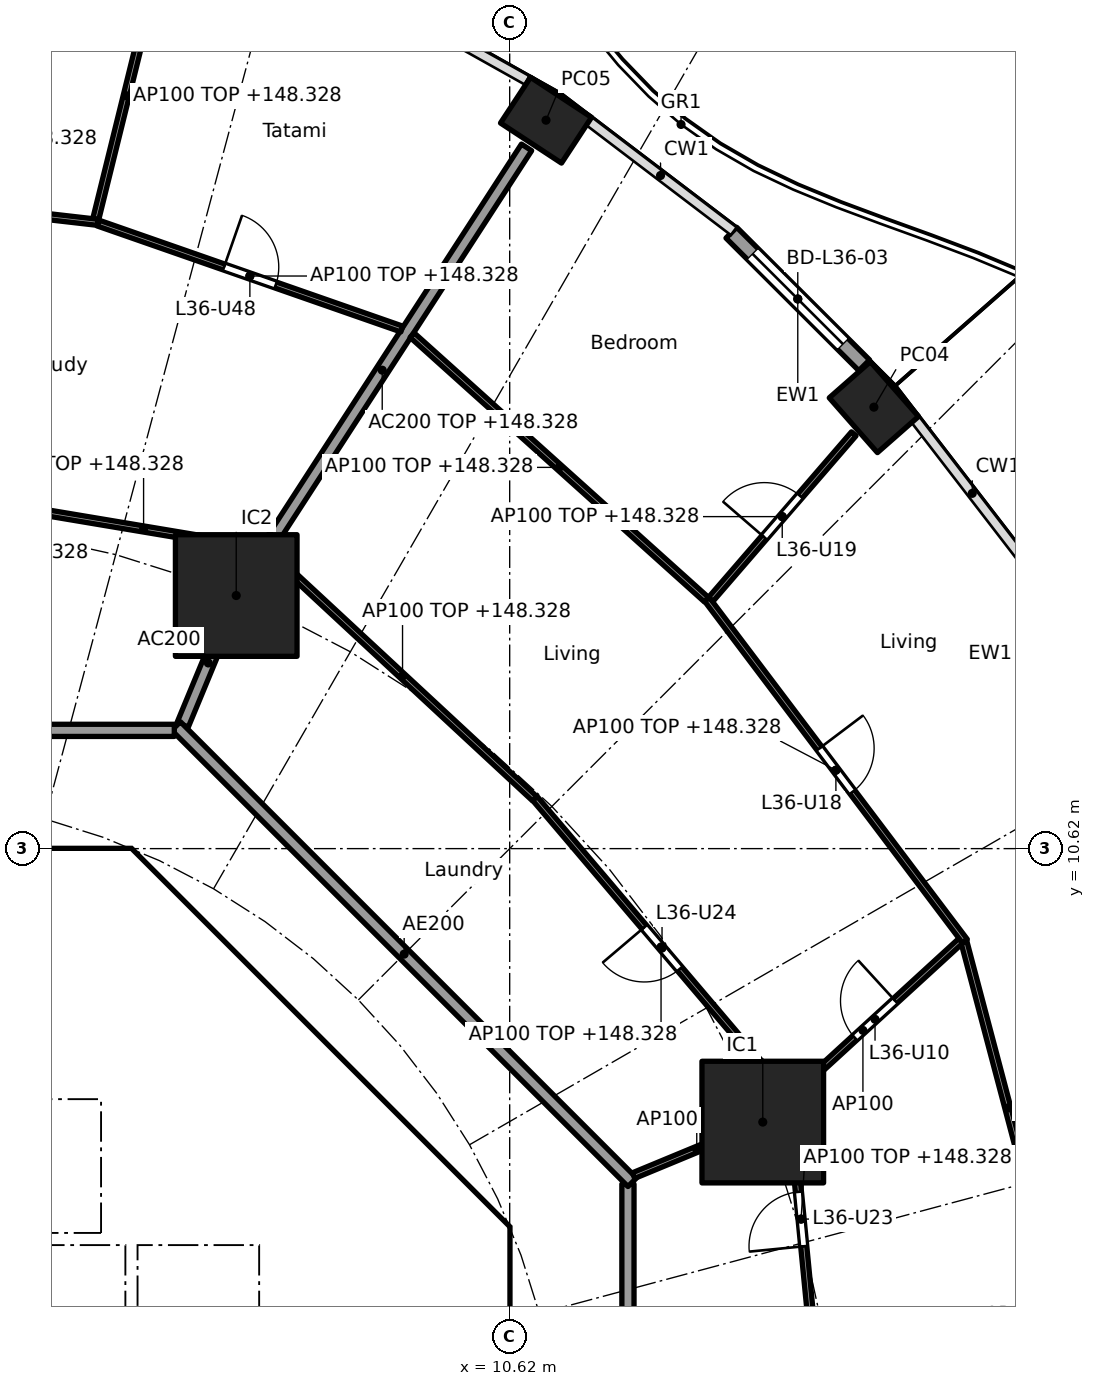
"""IFC4 building model, lengths in metres.
Left out: names, types, materials, properties, quantities, classifications, styles, units other than length and angle.
Written with IfcOpenShell. Run it as: python <this file> out.ifc"""

import sys

from ifc_helpers import new_model, si_unit, direction, frame, frame_2d, origin, origin_2d, place, context, subcontext, project, spatial, polyline, rectangle, hollow_rectangle, outline, extrude, element, fill, save


model = new_model("IFC4")
c1 = context("Model", 3, precision=1e-05, world=origin(), true_north=direction((0.0, 1.0)))
c2 = subcontext(c1, "Body", "Model", "MODEL_VIEW")
j1 = project(units=[si_unit("LENGTHUNIT", "METRE"), si_unit("PLANEANGLEUNIT", "RADIAN")], contexts=[c1])
p1 = place(None, origin())
s1 = spatial("IfcSite", under=j1, at=p1, CompositionType="ELEMENT")
p2 = place(p1, origin())
s2 = spatial("IfcBuilding", under=s1, at=p2, CompositionType="ELEMENT")
p3 = place(p2, frame((0.0, 0.0, 145.5)))
s3 = spatial("IfcBuildingStorey", under=s2, at=p3, CompositionType="ELEMENT", Elevation=145.5)
for number, where, z_axis, x_axis in (
    (1, (16.61, 17.88, 0.0), (0.0, 0.0, 1.0), (-0.66, 0.751, 0.0)),
    (2, (11.218, 22.599, 0.0), (0.0, 0.0, 1.0), (-0.836, 0.549, 0.0)),
):
    element("IfcColumn", number, at=place(p3, frame(where, z_axis=z_axis, x_axis=x_axis)), inside=s3, PredefinedType="COLUMN", context=c2, shape_type="SweptSolid", body=[
        extrude(hollow_rectangle(XDim=1.2, YDim=0.9, WallThickness=0.04, at=origin_2d()), origin(), (0.0, 0.0, 1.0), 3.7),
    ])
for number, where, z_axis, x_axis in (
    (3, (14.782, 6.123, 0.0), (0.0, 0.0, 1.0), (1.0, 0.0, 0.0)),
    (4, (6.123, 14.782, 0.0), (0.0, 0.0, 1.0), (1.0, 0.0, 0.0)),
):
    element("IfcColumn", number, at=place(p3, frame(where, z_axis=z_axis, x_axis=x_axis)), inside=s3, PredefinedType="COLUMN", context=c2, shape_type="SweptSolid", body=[
        extrude(rectangle(XDim=2.0, YDim=2.0, at=origin_2d()), origin(), (0.0, 0.0, 1.0), 3.7),
    ])
p4 = place(p3, frame((14.265, 20.749, 0.0), z_axis=(0.0, 0.0, 1.0), x_axis=(0.70789728551, -0.706315392135, 0.0)))
e5 = element("IfcWall", 5, at=p4, inside=s3, PredefinedType="SOLIDWALL", context=c2, shape_type="SweptSolid", body=[
    extrude(rectangle(XDim=3.087, YDim=0.25, at=frame_2d((1.543, 0.0))), origin(), (0.0, 0.0, 1.0), 3.44),
])
p5 = place(p4, frame((0.493, 0.0, 0.0)))
e6 = element("IfcOpeningElement", 6, at=p5, cuts=e5, PredefinedType="OPENING", context=c2, shape_type="SweptSolid", body=[
    extrude(rectangle(XDim=2.1, YDim=2.4, at=frame_2d((1.05, 1.2))), frame((0.0, 0.135, 0.0), z_axis=(0.0, -1.0, 0.0), x_axis=(1.0, 0.0, 0.0)), (0.0, 0.0, 1.0), 0.27),
])
p6 = place(p3, frame((9.988, 4.613, 0.0), z_axis=(0.0, 0.0, 1.0), x_axis=(-0.707106781187, 0.707106781187, 0.0)))
e7 = element("IfcWall", 7, at=p6, inside=s3, PredefinedType="SHEAR", context=c2, shape_type="SweptSolid", body=[
    extrude(rectangle(XDim=7.602, YDim=0.6, at=frame_2d((3.801, 0.0))), origin(), (0.0, 0.0, 1.0), 3.44),
])
p7 = place(p6, frame((3.201, 0.0, 0.0)))
e8 = element("IfcOpeningElement", 8, at=p7, cuts=e7, PredefinedType="OPENING", context=c2, shape_type="SweptSolid", body=[
    extrude(rectangle(XDim=1.2, YDim=2.1, at=frame_2d((0.6, 1.05))), frame((0.0, 0.31, 0.0), z_axis=(0.0, -1.0, 0.0), x_axis=(1.0, 0.0, 0.0)), (0.0, 0.0, 1.0), 0.62),
])
p8 = place(p3, frame((4.0, 4.3, 0.0), z_axis=(0.0, 0.0, 1.0), x_axis=(0.0, 1.0, 0.0)))
e9 = element("IfcWall", 9, at=p8, inside=s3, PredefinedType="SOLIDWALL", context=c2, shape_type="SweptSolid", body=[
    extrude(rectangle(XDim=2.2, YDim=0.2, at=frame_2d((1.1, 0.0))), origin(), (0.0, 0.0, 1.0), 3.44),
])
p9 = place(p8, frame((0.55, 0.0, 0.0)))
e10 = element("IfcOpeningElement", 10, at=p9, cuts=e9, PredefinedType="OPENING", context=c2, shape_type="SweptSolid", body=[
    extrude(rectangle(XDim=1.1, YDim=2.1, at=frame_2d((0.55, 1.05))), frame((0.0, 0.11, 0.0), z_axis=(0.0, -1.0, 0.0), x_axis=(1.0, 0.0, 0.0)), (0.0, 0.0, 1.0), 0.22),
])
p10 = place(p3, frame((6.7, 4.0, 0.0), z_axis=(0.0, 0.0, 1.0), x_axis=(1.0, 0.0, 0.0)))
e11 = element("IfcWall", 11, at=p10, inside=s3, PredefinedType="SOLIDWALL", context=c2, shape_type="SweptSolid", body=[
    extrude(rectangle(XDim=3.325, YDim=0.2, at=frame_2d((1.662, 0.0))), origin(), (0.0, 0.0, 1.0), 3.44),
])
p11 = place(p10, frame((1.25, 0.0, 0.0)))
e12 = element("IfcOpeningElement", 12, at=p11, cuts=e11, PredefinedType="OPENING", context=c2, shape_type="SweptSolid", body=[
    extrude(rectangle(XDim=1.1, YDim=2.1, at=frame_2d((0.55, 1.05))), frame((0.0, 0.11, 0.0), z_axis=(0.0, -1.0, 0.0), x_axis=(1.0, 0.0, 0.0)), (0.0, 0.0, 1.0), 0.22),
])
p12 = place(p3, frame((4.0, 7.025, 0.0), z_axis=(0.0, 0.0, 1.0), x_axis=(0.0, 1.0, 0.0)))
e13 = element("IfcWall", 13, at=p12, inside=s3, PredefinedType="SOLIDWALL", context=c2, shape_type="SweptSolid", body=[
    extrude(rectangle(XDim=3.0, YDim=0.2, at=frame_2d((1.5, 0.0))), origin(), (0.0, 0.0, 1.0), 3.44),
])
p13 = place(p12, frame((0.925, 0.0, 0.0)))
e14 = element("IfcOpeningElement", 14, at=p13, cuts=e13, PredefinedType="OPENING", context=c2, shape_type="SweptSolid", body=[
    extrude(rectangle(XDim=1.1, YDim=2.1, at=frame_2d((0.55, 1.05))), frame((0.0, 0.11, 0.0), z_axis=(0.0, -1.0, 0.0), x_axis=(1.0, 0.0, 0.0)), (0.0, 0.0, 1.0), 0.22),
])
p14 = place(p3, origin())
e15 = element("IfcWall", 15, at=p14, inside=s3, PredefinedType="SHEAR", context=c2, shape_type="SweptSolid", body=[
    extrude(outline(polyline([(-4.152, 10.025), (-4.401, 9.776), (-4.825, 10.2), (-4.401, 10.625), (4.401, 10.625), (4.825, 10.2), (4.401, 9.776), (4.152, 10.025), (-4.152, 10.025)])), origin(), (0.0, 0.0, 1.0), 3.44),
])
p15 = place(p3, origin())
e16 = element("IfcWall", 16, at=p15, inside=s3, PredefinedType="SHEAR", context=c2, shape_type="SweptSolid", body=[
    extrude(outline(polyline([(9.776, -4.401), (10.025, -4.152), (10.025, -3.801), (10.025, 4.152), (9.776, 4.401), (10.2, 4.825), (10.625, 4.401), (10.625, -4.401), (10.2, -4.825), (9.776, -4.401)])), origin(), (0.0, 0.0, 1.0), 3.44),
])
p16 = place(p3, origin())
e17 = element("IfcWall", 17, at=p16, inside=s3, PredefinedType="SOLIDWALL", context=c2, shape_type="SweptSolid", body=[
    extrude(outline(polyline([(-6.5, 2.1), (-6.7, 2.1), (-6.7, 4.3), (6.7, 4.3), (6.7, 2.1), (6.5, 2.1), (6.5, 4.1), (4.5, 4.1), (4.5, 2.1), (4.3, 2.1), (4.3, 4.1), (2.3, 4.1), (2.3, 2.1), (2.1, 2.1), (2.1, 4.1), (0.1, 4.1), (0.1, 2.1), (-0.1, 2.1), (-0.1, 4.1), (-2.1, 4.1), (-2.1, 2.1), (-2.3, 2.1), (-2.3, 4.1), (-4.3, 4.1), (-4.3, 2.1), (-4.5, 2.1), (-4.5, 4.1), (-6.5, 4.1), (-6.5, 2.1)])), origin(), (0.0, 0.0, 1.0), 3.44),
])
p17 = place(p3, origin())
e18 = element("IfcWall", 18, at=p17, inside=s3, PredefinedType="SOLIDWALL", context=c2, shape_type="SweptSolid", body=[
    extrude(outline(polyline([(4.1, 6.5), (-4.1, 6.5), (-4.1, 7.025), (4.1, 7.025), (4.1, 6.5)])), origin(), (0.0, 0.0, 1.0), 3.44),
])
p18 = place(p3, origin())
e19 = element("IfcWall", 19, at=p18, inside=s3, PredefinedType="SOLIDWALL", context=c2, shape_type="SweptSolid", body=[
    extrude(outline(polyline([(7.025, -3.9), (6.7, -3.9), (6.7, 3.9), (7.025, 3.9), (7.025, -3.9)])), origin(), (0.0, 0.0, 1.0), 3.44),
])
p19 = place(p3, frame((5.243, 12.657, 0.0), z_axis=(0.0, 0.0, 1.0), x_axis=(0.38273085373, 0.923859888513, 0.0)))
e20 = element("IfcWall", 20, at=p19, inside=s3, PredefinedType="PARTITIONING", context=c2, shape_type="SweptSolid", body=[
    extrude(rectangle(XDim=2.199, YDim=0.2, at=frame_2d((1.1, 0.0))), origin(), (0.0, 0.0, 1.0), 3.44),
])
p20 = place(p3, frame((6.15, 14.824, 0.0), z_axis=(0.0, 0.0, 1.0), x_axis=(0.543695254109, 0.839282711998, 0.0)))
e21 = element("IfcWall", 21, at=p20, inside=s3, PredefinedType="PARTITIONING", context=c2, shape_type="SweptSolid", body=[
    extrude(rectangle(XDim=8.731, YDim=0.2, at=frame_2d((4.366, 0.0))), origin(), (0.0, 0.0, 1.0), 2.828),
])
p21 = place(p3, frame((12.565, -5.104, 0.0), z_axis=(0.0, 0.0, 1.0), x_axis=(0.0, 1.0, 0.0)))
e22 = element("IfcWall", 22, at=p21, inside=s3, PredefinedType="PARTITIONING", context=c2, shape_type="SweptSolid", body=[
    extrude(rectangle(XDim=10.209, YDim=0.2, at=frame_2d((5.104, 0.0))), origin(), (0.0, 0.0, 1.0), 3.44),
])
p22 = place(p3, frame((12.635, 5.134, 0.0), z_axis=(0.0, 0.0, 1.0), x_axis=(-0.707106781187, 0.707106781187, 0.0)))
e23 = element("IfcWall", 23, at=p22, inside=s3, PredefinedType="PARTITIONING", context=c2, shape_type="SweptSolid", body=[
    extrude(rectangle(XDim=10.609, YDim=0.2, at=frame_2d((5.305, 0.0))), origin(), (0.0, 0.0, 1.0), 3.44),
])
p23 = place(p3, frame((5.104, 12.565, 0.0), z_axis=(0.0, 0.0, 1.0), x_axis=(-1.0, 0.0, 0.0)))
e24 = element("IfcWall", 24, at=p23, inside=s3, PredefinedType="PARTITIONING", context=c2, shape_type="SweptSolid", body=[
    extrude(rectangle(XDim=10.409, YDim=0.2, at=frame_2d((5.205, 0.0))), origin(), (0.0, 0.0, 1.0), 3.44),
])
p24 = place(p3, frame((15.602, 2.584, 0.0), z_axis=(0.0, 0.0, 1.0), x_axis=(-0.097207196705, 0.995264166394, 0.0)))
e25 = element("IfcWall", 25, at=p24, inside=s3, PredefinedType="PARTITIONING", context=c2, shape_type="SweptSolid", body=[
    extrude(rectangle(XDim=3.906, YDim=0.1, at=frame_2d((1.953, 0.0))), origin(), (0.0, 0.0, 1.0), 2.828),
])
p25 = place(p24, frame((1.503, 0.0, 0.0)))
e26 = element("IfcOpeningElement", 26, at=p25, cuts=e25, PredefinedType="OPENING", context=c2, shape_type="SweptSolid", body=[
    extrude(rectangle(XDim=0.9, YDim=2.1, at=frame_2d((0.45, 1.05))), frame((0.0, 0.06, 0.0), z_axis=(0.0, -1.0, 0.0), x_axis=(1.0, 0.0, 0.0)), (0.0, 0.0, 1.0), 0.12),
])
p26 = place(p3, frame((19.537, 3.62, 0.0), z_axis=(0.0, 0.0, 1.0), x_axis=(-0.255892560316, 0.966705227862, 0.0)))
e27 = element("IfcWall", 27, at=p26, inside=s3, PredefinedType="PARTITIONING", context=c2, shape_type="SweptSolid", body=[
    extrude(rectangle(XDim=5.659, YDim=0.1, at=frame_2d((2.829, 0.0))), origin(), (0.0, 0.0, 1.0), 2.828),
])
p27 = place(p3, frame((12.657, 5.243, 0.0), z_axis=(0.0, 0.0, 1.0), x_axis=(0.923848837015, 0.382757529444, 0.0)))
e28 = element("IfcWall", 28, at=p27, inside=s3, PredefinedType="PARTITIONING", context=c2, shape_type="SweptSolid", body=[
    extrude(rectangle(XDim=2.25, YDim=0.1, at=frame_2d((1.125, 0.0))), origin(), (0.0, 0.0, 1.0), 3.44),
])
p28 = place(p3, frame((14.819, 6.157, 0.0), z_axis=(0.0, 0.0, 1.0), x_axis=(0.737620514432, 0.675215503887, 0.0)))
e29 = element("IfcWall", 29, at=p28, inside=s3, PredefinedType="PARTITIONING", context=c2, shape_type="SweptSolid", body=[
    extrude(rectangle(XDim=4.366, YDim=0.1, at=frame_2d((2.183, 0.0))), origin(), (0.0, 0.0, 1.0), 3.44),
])
p29 = place(p28, frame((2.003, 0.0, 0.0)))
e30 = element("IfcOpeningElement", 30, at=p29, cuts=e29, PredefinedType="OPENING", context=c2, shape_type="SweptSolid", body=[
    extrude(rectangle(XDim=0.9, YDim=2.1, at=frame_2d((0.45, 1.05))), frame((0.0, 0.06, 0.0), z_axis=(0.0, -1.0, 0.0), x_axis=(1.0, 0.0, 0.0)), (0.0, 0.0, 1.0), 0.12),
])
p30 = place(p3, frame((15.185, 6.559, 0.0), z_axis=(0.0, 0.0, 1.0), x_axis=(-0.647361044962, 0.762183493304, 0.0)))
e31 = element("IfcWall", 31, at=p30, inside=s3, PredefinedType="PARTITIONING", context=c2, shape_type="SweptSolid", body=[
    extrude(rectangle(XDim=6.413, YDim=0.1, at=frame_2d((3.207, 0.0))), origin(), (0.0, 0.0, 1.0), 2.828),
])
p31 = place(p30, frame((2.731, 0.0, 0.0)))
e32 = element("IfcOpeningElement", 32, at=p31, cuts=e31, PredefinedType="OPENING", context=c2, shape_type="SweptSolid", body=[
    extrude(rectangle(XDim=0.9, YDim=2.1, at=frame_2d((0.45, 1.05))), frame((0.0, 0.06, 0.0), z_axis=(0.0, -1.0, 0.0), x_axis=(1.0, 0.0, 0.0)), (0.0, 0.0, 1.0), 0.12),
])
p32 = place(p3, frame((18.106, 9.098, 0.0), z_axis=(0.0, 0.0, 1.0), x_axis=(-0.602398572907, 0.798195439325, 0.0)))
e33 = element("IfcWall", 33, at=p32, inside=s3, PredefinedType="PARTITIONING", context=c2, shape_type="SweptSolid", body=[
    extrude(rectangle(XDim=7.044, YDim=0.1, at=frame_2d((3.522, 0.0))), origin(), (0.0, 0.0, 1.0), 2.828),
])
p33 = place(p32, frame((3.072, 0.0, 0.0)))
e34 = element("IfcOpeningElement", 34, at=p33, cuts=e33, PredefinedType="OPENING", context=c2, shape_type="SweptSolid", body=[
    extrude(rectangle(XDim=0.9, YDim=2.1, at=frame_2d((0.45, 1.05))), frame((0.0, 0.06, 0.0), z_axis=(0.0, -1.0, 0.0), x_axis=(1.0, 0.0, 0.0)), (0.0, 0.0, 1.0), 0.12),
])
p34 = place(p3, frame((11.029, 11.443, 0.0), z_axis=(0.0, 0.0, 1.0), x_axis=(-0.733113447346, 0.680106369122, 0.0)))
e35 = element("IfcWall", 35, at=p34, inside=s3, PredefinedType="PARTITIONING", context=c2, shape_type="SweptSolid", body=[
    extrude(rectangle(XDim=5.923, YDim=0.1, at=frame_2d((2.961, 0.0))), origin(), (0.0, 0.0, 1.0), 2.828),
])
p35 = place(p3, frame((13.926, 14.719, 0.0), z_axis=(0.0, 0.0, 1.0), x_axis=(0.653831857253, 0.756639876323, 0.0)))
e36 = element("IfcWall", 36, at=p35, inside=s3, PredefinedType="PARTITIONING", context=c2, shape_type="SweptSolid", body=[
    extrude(rectangle(XDim=3.598, YDim=0.1, at=frame_2d((1.799, 0.0))), origin(), (0.0, 0.0, 1.0), 2.828),
])
p36 = place(p35, frame((1.349, 0.0, 0.0)))
e37 = element("IfcOpeningElement", 37, at=p36, cuts=e36, PredefinedType="OPENING", context=c2, shape_type="SweptSolid", body=[
    extrude(rectangle(XDim=0.9, YDim=2.1, at=frame_2d((0.45, 1.05))), frame((0.0, 0.06, 0.0), z_axis=(0.0, -1.0, 0.0), x_axis=(1.0, 0.0, 0.0)), (0.0, 0.0, 1.0), 0.12),
])
p37 = place(p3, frame((13.856, 14.714, 0.0), z_axis=(0.0, 0.0, 1.0), x_axis=(-0.743799395746, 0.668402916577, 0.0)))
e38 = element("IfcWall", 38, at=p37, inside=s3, PredefinedType="PARTITIONING", context=c2, shape_type="SweptSolid", body=[
    extrude(rectangle(XDim=6.509, YDim=0.1, at=frame_2d((3.254, 0.0))), origin(), (0.0, 0.0, 1.0), 2.828),
])
p38 = place(p3, frame((6.515, 15.556, 0.0), z_axis=(0.0, 0.0, 1.0), x_axis=(-0.986271328884, 0.16513287323, 0.0)))
e39 = element("IfcWall", 39, at=p38, inside=s3, PredefinedType="PARTITIONING", context=c2, shape_type="SweptSolid", body=[
    extrude(rectangle(XDim=3.884, YDim=0.1, at=frame_2d((1.942, 0.0))), origin(), (0.0, 0.0, 1.0), 2.828),
])
p39 = place(p3, frame((8.846, 19.165, 0.0), z_axis=(0.0, 0.0, 1.0), x_axis=(-0.944186503813, 0.329411362915, 0.0)))
e40 = element("IfcWall", 40, at=p39, inside=s3, PredefinedType="PARTITIONING", context=c2, shape_type="SweptSolid", body=[
    extrude(rectangle(XDim=5.293, YDim=0.1, at=frame_2d((2.646, 0.0))), origin(), (0.0, 0.0, 1.0), 2.828),
])
p40 = place(p39, frame((2.197, 0.0, 0.0)))
e41 = element("IfcOpeningElement", 41, at=p40, cuts=e40, PredefinedType="OPENING", context=c2, shape_type="SweptSolid", body=[
    extrude(rectangle(XDim=0.9, YDim=2.1, at=frame_2d((0.45, 1.05))), frame((0.0, 0.06, 0.0), z_axis=(0.0, -1.0, 0.0), x_axis=(1.0, 0.0, 0.0)), (0.0, 0.0, 1.0), 0.12),
])
p41 = place(p3, frame((3.813, 20.973, 0.0), z_axis=(0.0, 0.0, 1.0), x_axis=(0.239977551632, 0.970778437499, 0.0)))
e42 = element("IfcWall", 42, at=p41, inside=s3, PredefinedType="PARTITIONING", context=c2, shape_type="SweptSolid", body=[
    extrude(rectangle(XDim=4.178, YDim=0.1, at=frame_2d((2.089, 0.0))), origin(), (0.0, 0.0, 1.0), 2.828),
])
p42 = place(p3, frame((3.851, 20.919, 0.0), z_axis=(0.0, 0.0, 1.0), x_axis=(-0.993519908136, 0.11365822512, 0.0)))
e43 = element("IfcWall", 43, at=p42, inside=s3, PredefinedType="PARTITIONING", context=c2, shape_type="SweptSolid", body=[
    extrude(rectangle(XDim=5.613, YDim=0.1, at=frame_2d((2.806, 0.0))), origin(), (0.0, 0.0, 1.0), 2.828),
])
p43 = place(p5, origin())
e44 = element("IfcDoor", 44, at=p43, inside=s3, OperationType="SLIDING_TO_LEFT", PredefinedType="DOOR", context=c2, shape_type="SweptSolid", body=[
    extrude(rectangle(XDim=2.1, YDim=2.4, at=frame_2d((1.05, 1.2))), frame((0.0, 0.025, 0.0), z_axis=(0.0, -1.0, 0.0), x_axis=(1.0, 0.0, 0.0)), (0.0, 0.0, 1.0), 0.05),
])
fill(e6, e44)
p44 = place(p9, origin())
e45 = element("IfcDoor", 45, at=p44, inside=s3, OperationType="DOUBLE_DOOR_SLIDING", PredefinedType="DOOR", context=c2, shape_type="SweptSolid", body=[
    extrude(rectangle(XDim=1.1, YDim=2.1, at=frame_2d((0.55, 1.05))), frame((0.0, 0.025, 0.0), z_axis=(0.0, -1.0, 0.0), x_axis=(1.0, 0.0, 0.0)), (0.0, 0.0, 1.0), 0.05),
])
fill(e10, e45)
p45 = place(p11, frame((1.1, 0.0, 0.0), x_axis=(-1.0, 0.0, 0.0)))
e46 = element("IfcDoor", 46, at=p45, inside=s3, OperationType="SINGLE_SWING_RIGHT", PredefinedType="DOOR", context=c2, shape_type="SweptSolid", body=[
    extrude(rectangle(XDim=1.1, YDim=2.1, at=frame_2d((0.55, 1.05))), frame((0.0, 0.025, 0.0), z_axis=(0.0, -1.0, 0.0), x_axis=(1.0, 0.0, 0.0)), (0.0, 0.0, 1.0), 0.05),
])
fill(e12, e46)
p46 = place(p13, origin())
e47 = element("IfcDoor", 47, at=p46, inside=s3, OperationType="SINGLE_SWING_LEFT", PredefinedType="DOOR", context=c2, shape_type="SweptSolid", body=[
    extrude(rectangle(XDim=1.1, YDim=2.1, at=frame_2d((0.55, 1.05))), frame((0.0, 0.025, 0.0), z_axis=(0.0, -1.0, 0.0), x_axis=(1.0, 0.0, 0.0)), (0.0, 0.0, 1.0), 0.05),
])
fill(e14, e47)
p47 = place(p7, origin())
e48 = element("IfcDoor", 48, at=p47, inside=s3, OperationType="SINGLE_SWING_LEFT", PredefinedType="DOOR", context=c2, shape_type="SweptSolid", body=[
    extrude(rectangle(XDim=1.2, YDim=2.1, at=frame_2d((0.6, 1.05))), frame((0.0, 0.025, 0.0), z_axis=(0.0, -1.0, 0.0), x_axis=(1.0, 0.0, 0.0)), (0.0, 0.0, 1.0), 0.05),
])
fill(e8, e48)
p48 = place(p29, origin())
e49 = element("IfcDoor", 49, at=p48, inside=s3, OperationType="SINGLE_SWING_RIGHT", PredefinedType="DOOR", context=c2, shape_type="SweptSolid", body=[
    extrude(rectangle(XDim=0.9, YDim=2.1, at=frame_2d((0.45, 1.05))), frame((0.0, 0.025, 0.0), z_axis=(0.0, -1.0, 0.0), x_axis=(1.0, 0.0, 0.0)), (0.0, 0.0, 1.0), 0.05),
])
fill(e30, e49)
p49 = place(p33, frame((0.9, 0.0, 0.0), x_axis=(-1.0, 0.0, 0.0)))
e50 = element("IfcDoor", 50, at=p49, inside=s3, OperationType="SINGLE_SWING_LEFT", PredefinedType="DOOR", context=c2, shape_type="SweptSolid", body=[
    extrude(rectangle(XDim=0.9, YDim=2.1, at=frame_2d((0.45, 1.05))), frame((0.0, 0.025, 0.0), z_axis=(0.0, -1.0, 0.0), x_axis=(1.0, 0.0, 0.0)), (0.0, 0.0, 1.0), 0.05),
])
fill(e34, e50)
p50 = place(p36, origin())
e51 = element("IfcDoor", 51, at=p50, inside=s3, OperationType="SINGLE_SWING_LEFT", PredefinedType="DOOR", context=c2, shape_type="SweptSolid", body=[
    extrude(rectangle(XDim=0.9, YDim=2.1, at=frame_2d((0.45, 1.05))), frame((0.0, 0.025, 0.0), z_axis=(0.0, -1.0, 0.0), x_axis=(1.0, 0.0, 0.0)), (0.0, 0.0, 1.0), 0.05),
])
fill(e37, e51)
p51 = place(p25, origin())
e52 = element("IfcDoor", 52, at=p51, inside=s3, OperationType="SINGLE_SWING_LEFT", PredefinedType="DOOR", context=c2, shape_type="SweptSolid", body=[
    extrude(rectangle(XDim=0.9, YDim=2.1, at=frame_2d((0.45, 1.05))), frame((0.0, 0.025, 0.0), z_axis=(0.0, -1.0, 0.0), x_axis=(1.0, 0.0, 0.0)), (0.0, 0.0, 1.0), 0.05),
])
fill(e26, e52)
p52 = place(p31, origin())
e53 = element("IfcDoor", 53, at=p52, inside=s3, OperationType="SINGLE_SWING_RIGHT", PredefinedType="DOOR", context=c2, shape_type="SweptSolid", body=[
    extrude(rectangle(XDim=0.9, YDim=2.1, at=frame_2d((0.45, 1.05))), frame((0.0, 0.025, 0.0), z_axis=(0.0, -1.0, 0.0), x_axis=(1.0, 0.0, 0.0)), (0.0, 0.0, 1.0), 0.05),
])
fill(e32, e53)
p53 = place(p40, frame((0.9, 0.0, 0.0), x_axis=(-1.0, 0.0, 0.0)))
e54 = element("IfcDoor", 54, at=p53, inside=s3, OperationType="SINGLE_SWING_LEFT", PredefinedType="DOOR", context=c2, shape_type="SweptSolid", body=[
    extrude(rectangle(XDim=0.9, YDim=2.1, at=frame_2d((0.45, 1.05))), frame((0.0, 0.025, 0.0), z_axis=(0.0, -1.0, 0.0), x_axis=(1.0, 0.0, 0.0)), (0.0, 0.0, 1.0), 0.05),
])
fill(e41, e54)
save(model, sys.argv[1])
